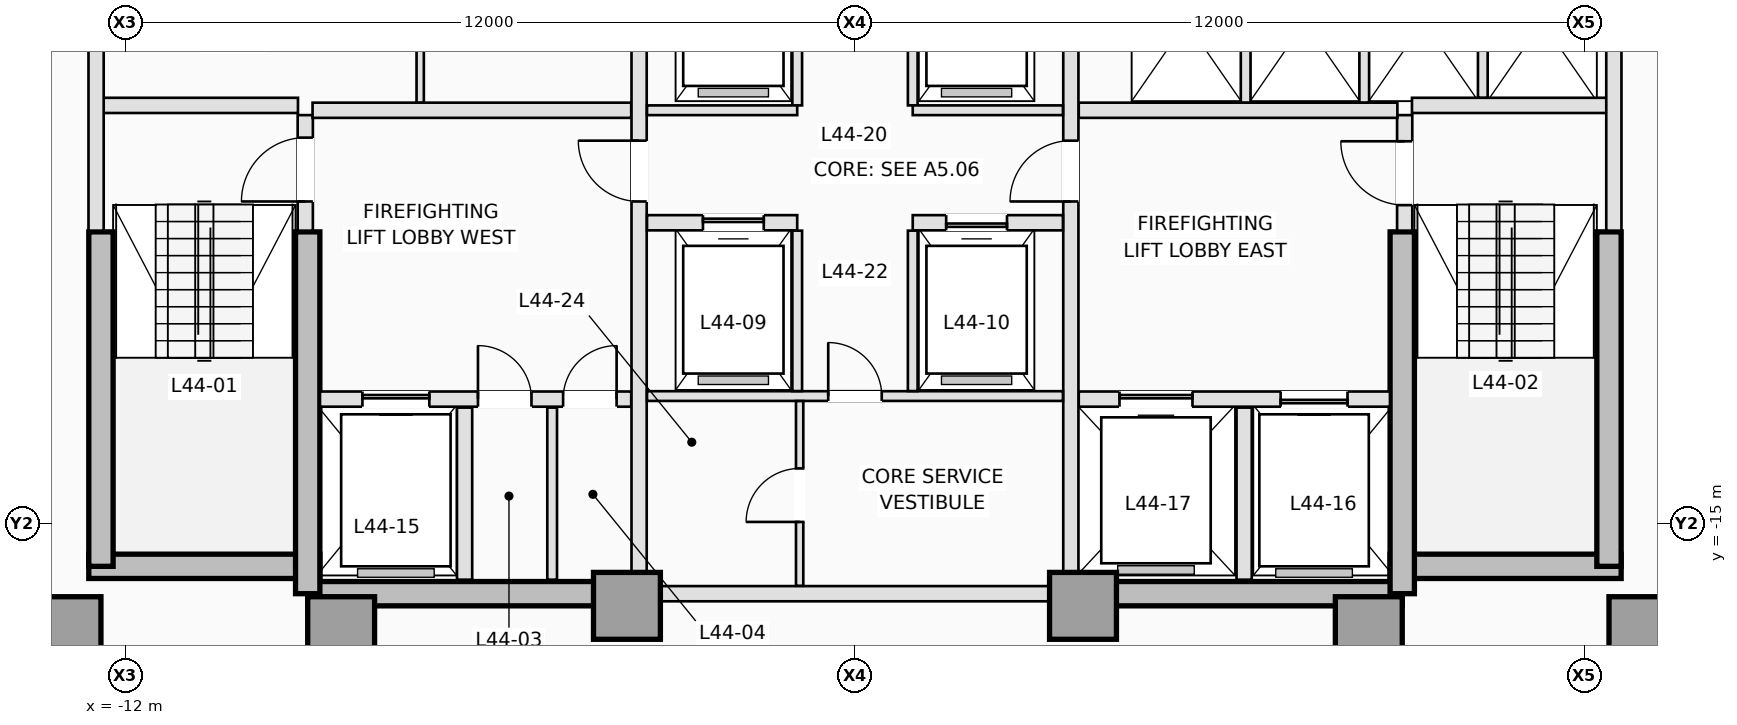
"""IFC4 building model, lengths in metres.
Left out: names, types, materials, properties, quantities, classifications, styles, units other than length and angle.
Written with IfcOpenShell. Run it as: python <this file> out.ifc"""

import sys

from ifc_helpers import new_model, si_unit, direction, frame, frame_2d, origin, origin_2d, place, context, subcontext, project, spatial, rectangle, extrude, element, fill, save


model = new_model("IFC4")
c1 = context("Model", 3, precision=1e-05, world=origin(), true_north=direction((0.0, 1.0)))
c2 = subcontext(c1, "Body", "Model", "MODEL_VIEW")
j1 = project(units=[si_unit("LENGTHUNIT", "METRE"), si_unit("PLANEANGLEUNIT", "RADIAN")], contexts=[c1])
p1 = place(None, origin())
s1 = spatial("IfcSite", under=j1, at=p1, CompositionType="ELEMENT")
p2 = place(p1, origin())
s2 = spatial("IfcBuilding", under=s1, at=p2, CompositionType="ELEMENT")
p3 = place(p2, frame((0.0, 0.0, 161.5)))
s3 = spatial("IfcBuildingStorey", under=s2, at=p3, CompositionType="ELEMENT", Elevation=161.5)
p4 = place(p3, frame((-12.6, -15.7, 0.0), z_axis=(0.0, 0.0, 1.0), x_axis=(1.0, 0.0, 0.0)))
e1 = element("IfcWall", 1, at=p4, inside=s3, PredefinedType="SHEAR", context=c2, shape_type="SweptSolid", body=[
    extrude(rectangle(XDim=3.8, YDim=0.4, at=frame_2d((1.9, 0.0))), origin(), (0.0, 0.0, 1.0), 3.5),
])
for number, where, z_axis, x_axis in (
    (2, (-9.0, -16.15, 0.0), (0.0, 0.0, 1.0), (1.0, 0.0, 0.0)),
    (3, (3.75, -16.15, 0.0), (0.0, 0.0, 1.0), (1.0, 0.0, 0.0)),
):
    element("IfcWall", number, at=place(p3, frame(where, z_axis=z_axis, x_axis=x_axis)), inside=s3, PredefinedType="SHEAR", context=c2, shape_type="SweptSolid", body=[
        extrude(rectangle(XDim=5.25, YDim=0.4, at=frame_2d((2.625, 0.0))), origin(), (0.0, 0.0, 1.0), 3.5),
    ])
p5 = place(p3, frame((8.8, -15.7, 0.0), z_axis=(0.0, 0.0, 1.0), x_axis=(1.0, 0.0, 0.0)))
e4 = element("IfcWall", 4, at=p5, inside=s3, PredefinedType="SHEAR", context=c2, shape_type="SweptSolid", body=[
    extrude(rectangle(XDim=3.8, YDim=0.4, at=frame_2d((1.9, 0.0))), origin(), (0.0, 0.0, 1.0), 3.5),
])
for number, where, z_axis, x_axis in (
    (5, (-12.4, -15.7, 0.0), (0.0, 0.0, 1.0), (0.0, 1.0, 0.0)),
    (6, (12.4, -15.7, 0.0), (0.0, 0.0, 1.0), (0.0, 1.0, 0.0)),
):
    element("IfcWall", number, at=place(p3, frame(where, z_axis=z_axis, x_axis=x_axis)), inside=s3, PredefinedType="SHEAR", context=c2, shape_type="SweptSolid", body=[
        extrude(rectangle(XDim=5.5, YDim=0.4, at=frame_2d((2.75, 0.0))), origin(), (0.0, 0.0, 1.0), 3.5),
    ])
for number, where, z_axis, x_axis in (
    (7, (-9.0, -16.15, 0.0), (0.0, 0.0, 1.0), (0.0, 1.0, 0.0)),
    (8, (9.0, -16.15, 0.0), (0.0, 0.0, 1.0), (0.0, 1.0, 0.0)),
):
    element("IfcWall", number, at=place(p3, frame(where, z_axis=z_axis, x_axis=x_axis)), inside=s3, PredefinedType="SHEAR", context=c2, shape_type="SweptSolid", body=[
        extrude(rectangle(XDim=5.95, YDim=0.4, at=frame_2d((2.975, 0.0))), origin(), (0.0, 0.0, 1.0), 3.5),
    ])
for number, where, z_axis, x_axis in (
    (9, (-12.95, -16.75, 0.0), (0.0, 0.0, 1.0), (1.0, 0.0, 0.0)),
    (10, (-8.45, -16.75, 0.0), (0.0, 0.0, 1.0), (1.0, 0.0, 0.0)),
    (11, (-3.75, -16.35, 0.0), (0.0, 0.0, 1.0), (1.0, 0.0, 0.0)),
    (12, (3.75, -16.35, 0.0), (0.0, 0.0, 1.0), (1.0, 0.0, 0.0)),
    (13, (8.45, -16.75, 0.0), (0.0, 0.0, 1.0), (1.0, 0.0, 0.0)),
    (14, (12.95, -16.75, 0.0), (0.0, 0.0, 1.0), (1.0, 0.0, 0.0)),
):
    element("IfcColumn", number, at=place(p3, frame(where, z_axis=z_axis, x_axis=x_axis)), inside=s3, PredefinedType="COLUMN", context=c2, shape_type="SweptSolid", body=[
        extrude(rectangle(XDim=1.1, YDim=1.1, at=origin_2d()), origin(), (0.0, 0.0, 1.0), 3.5),
    ])
p6 = place(p3, frame((-9.04, -10.18, 0.0), z_axis=(0.0, 0.0, 1.0), x_axis=(0.0, 1.0, 0.0)))
e15 = element("IfcWall", 15, at=p6, inside=s3, PredefinedType="PARTITIONING", context=c2, shape_type="SweptSolid", body=[
    extrude(rectangle(XDim=1.9, YDim=0.25, at=frame_2d((0.95, 0.0))), origin(), (0.0, 0.0, 1.0), 3.25),
])
p7 = place(p6, frame((0.48, 0.0, 0.0)))
e16 = element("IfcOpeningElement", 16, at=p7, cuts=e15, PredefinedType="OPENING", context=c2, shape_type="SweptSolid", body=[
    extrude(rectangle(XDim=1.05, YDim=2.15, at=frame_2d((0.525, 1.075))), frame((0.0, 0.135, 0.0), z_axis=(0.0, -1.0, 0.0), x_axis=(1.0, 0.0, 0.0)), (0.0, 0.0, 1.0), 0.27),
])
p8 = place(p3, frame((9.04, -10.18, 0.0), z_axis=(0.0, 0.0, 1.0), x_axis=(0.0, 1.0, 0.0)))
e17 = element("IfcWall", 17, at=p8, inside=s3, PredefinedType="PARTITIONING", context=c2, shape_type="SweptSolid", body=[
    extrude(rectangle(XDim=1.9, YDim=0.25, at=frame_2d((0.95, 0.0))), origin(), (0.0, 0.0, 1.0), 3.25),
])
p9 = place(p8, frame((0.42, 0.0, 0.0)))
e18 = element("IfcOpeningElement", 18, at=p9, cuts=e17, PredefinedType="OPENING", context=c2, shape_type="SweptSolid", body=[
    extrude(rectangle(XDim=1.05, YDim=2.15, at=frame_2d((0.525, 1.075))), frame((0.0, 0.135, 0.0), z_axis=(0.0, -1.0, 0.0), x_axis=(1.0, 0.0, 0.0)), (0.0, 0.0, 1.0), 0.27),
])
for number, where, z_axis, x_axis in (
    (19, (-12.38, -8.12, 0.0), (0.0, 0.0, 1.0), (1.0, 0.0, 0.0)),
    (20, (9.16, -8.12, 0.0), (0.0, 0.0, 1.0), (1.0, 0.0, 0.0)),
):
    element("IfcWall", number, at=place(p3, frame(where, z_axis=z_axis, x_axis=x_axis)), inside=s3, PredefinedType="PARTITIONING", context=c2, shape_type="SweptSolid", body=[
        extrude(rectangle(XDim=3.22, YDim=0.25, at=frame_2d((1.61, 0.0))), origin(), (0.0, 0.0, 1.0), 3.25),
    ])
for number, where, z_axis, x_axis in (
    (21, (-12.48, -10.18, 0.0), (0.0, 0.0, 1.0), (0.0, 1.0, 0.0)),
    (22, (12.48, -10.18, 0.0), (0.0, 0.0, 1.0), (0.0, 1.0, 0.0)),
):
    element("IfcWall", number, at=place(p3, frame(where, z_axis=z_axis, x_axis=x_axis)), inside=s3, PredefinedType="PARTITIONING", context=c2, shape_type="SweptSolid", body=[
        extrude(rectangle(XDim=4.828, YDim=0.25, at=frame_2d((2.414, 0.0))), origin(), (0.0, 0.0, 1.0), 3.25),
    ])
p10 = place(p3, frame((-8.798, -12.95, 0.0), z_axis=(0.0, 0.0, 1.0), x_axis=(1.0, 0.0, 0.0)))
e23 = element("IfcWall", 23, at=p10, inside=s3, PredefinedType="PARTITIONING", context=c2, shape_type="SweptSolid", body=[
    extrude(rectangle(XDim=5.118, YDim=0.25, at=frame_2d((2.559, 0.0))), origin(), (0.0, 0.0, 1.0), 3.25),
])
p11 = place(p10, frame((0.698, 0.0, 0.0)))
e24 = element("IfcOpeningElement", 24, at=p11, cuts=e23, PredefinedType="OPENING", context=c2, shape_type="SweptSolid", body=[
    extrude(rectangle(XDim=1.1, YDim=2.15, at=frame_2d((0.55, 1.075))), frame((0.0, 0.135, 0.0), z_axis=(0.0, -1.0, 0.0), x_axis=(1.0, 0.0, 0.0)), (0.0, 0.0, 1.0), 0.27),
])
p12 = place(p10, frame((2.598, 0.0, 0.0)))
e25 = element("IfcOpeningElement", 25, at=p12, cuts=e23, PredefinedType="OPENING", context=c2, shape_type="SweptSolid", body=[
    extrude(rectangle(XDim=0.88, YDim=2.1, at=frame_2d((0.44, 1.05))), frame((0.0, 0.135, 0.0), z_axis=(0.0, -1.0, 0.0), x_axis=(1.0, 0.0, 0.0)), (0.0, 0.0, 1.0), 0.27),
])
p13 = place(p10, frame((3.998, 0.0, 0.0)))
e26 = element("IfcOpeningElement", 26, at=p13, cuts=e23, PredefinedType="OPENING", context=c2, shape_type="SweptSolid", body=[
    extrude(rectangle(XDim=0.88, YDim=2.1, at=frame_2d((0.44, 1.05))), frame((0.0, 0.135, 0.0), z_axis=(0.0, -1.0, 0.0), x_axis=(1.0, 0.0, 0.0)), (0.0, 0.0, 1.0), 0.27),
])
p14 = place(p3, frame((3.68, -12.95, 0.0), z_axis=(0.0, 0.0, 1.0), x_axis=(1.0, 0.0, 0.0)))
e27 = element("IfcWall", 27, at=p14, inside=s3, PredefinedType="PARTITIONING", context=c2, shape_type="SweptSolid", body=[
    extrude(rectangle(XDim=5.118, YDim=0.25, at=frame_2d((2.559, 0.0))), origin(), (0.0, 0.0, 1.0), 3.25),
])
p15 = place(p14, frame((3.32, 0.0, 0.0)))
e28 = element("IfcOpeningElement", 28, at=p15, cuts=e27, PredefinedType="OPENING", context=c2, shape_type="SweptSolid", body=[
    extrude(rectangle(XDim=1.1, YDim=2.15, at=frame_2d((0.55, 1.075))), frame((0.0, 0.135, 0.0), z_axis=(0.0, -1.0, 0.0), x_axis=(1.0, 0.0, 0.0)), (0.0, 0.0, 1.0), 0.27),
])
p16 = place(p14, frame((0.67, 0.0, 0.0)))
e29 = element("IfcOpeningElement", 29, at=p16, cuts=e27, PredefinedType="OPENING", context=c2, shape_type="SweptSolid", body=[
    extrude(rectangle(XDim=1.2, YDim=2.15, at=frame_2d((0.6, 1.075))), frame((0.0, 0.135, 0.0), z_axis=(0.0, -1.0, 0.0), x_axis=(1.0, 0.0, 0.0)), (0.0, 0.0, 1.0), 0.27),
])
p17 = place(p3, frame((-6.42, -15.92, 0.0), z_axis=(0.0, 0.0, 1.0), x_axis=(0.0, 1.0, 0.0)))
e30 = element("IfcWall", 30, at=p17, inside=s3, PredefinedType="PARTITIONING", context=c2, shape_type="SweptSolid", body=[
    extrude(rectangle(XDim=2.83, YDim=0.25, at=frame_2d((1.415, 0.0))), origin(), (0.0, 0.0, 1.0), 3.25),
])
p18 = place(p3, frame((-4.98, -15.92, 0.0), z_axis=(0.0, 0.0, 1.0), x_axis=(0.0, 1.0, 0.0)))
e31 = element("IfcWall", 31, at=p18, inside=s3, PredefinedType="PARTITIONING", context=c2, shape_type="SweptSolid", body=[
    extrude(rectangle(XDim=2.83, YDim=0.16, at=frame_2d((1.415, 0.0))), origin(), (0.0, 0.0, 1.0), 3.25),
])
p19 = place(p3, frame((6.4, -15.92, 0.0), z_axis=(0.0, 0.0, 1.0), x_axis=(0.0, 1.0, 0.0)))
e32 = element("IfcWall", 32, at=p19, inside=s3, PredefinedType="PARTITIONING", context=c2, shape_type="SweptSolid", body=[
    extrude(rectangle(XDim=2.83, YDim=0.25, at=frame_2d((1.415, 0.0))), origin(), (0.0, 0.0, 1.0), 3.25),
])
for number, where, z_axis, x_axis in (
    (33, (-8.92, -8.2, 0.0), (0.0, 0.0, 1.0), (1.0, 0.0, 0.0)),
    (34, (3.68, -8.2, 0.0), (0.0, 0.0, 1.0), (1.0, 0.0, 0.0)),
):
    element("IfcWall", number, at=place(p3, frame(where, z_axis=z_axis, x_axis=x_axis)), inside=s3, PredefinedType="PARTITIONING", context=c2, shape_type="SweptSolid", body=[
        extrude(rectangle(XDim=5.24, YDim=0.25, at=frame_2d((2.62, 0.0))), origin(), (0.0, 0.0, 1.0), 3.25),
    ])
p20 = place(p3, frame((-3.55, -15.798, 0.0), z_axis=(0.0, 0.0, 1.0), x_axis=(0.0, 1.0, 0.0)))
e35 = element("IfcWall", 35, at=p20, inside=s3, PredefinedType="PARTITIONING", context=c2, shape_type="SweptSolid", body=[
    extrude(rectangle(XDim=10.446, YDim=0.25, at=frame_2d((5.223, 0.0))), origin(), (0.0, 0.0, 1.0), 3.25),
])
p21 = place(p20, frame((6.098, 0.0, 0.0)))
e36 = element("IfcOpeningElement", 36, at=p21, cuts=e35, PredefinedType="OPENING", context=c2, shape_type="SweptSolid", body=[
    extrude(rectangle(XDim=1.0, YDim=2.15, at=frame_2d((0.5, 1.075))), frame((0.0, 0.135, 0.0), z_axis=(0.0, -1.0, 0.0), x_axis=(1.0, 0.0, 0.0)), (0.0, 0.0, 1.0), 0.27),
])
p22 = place(p3, frame((3.55, -15.798, 0.0), z_axis=(0.0, 0.0, 1.0), x_axis=(0.0, 1.0, 0.0)))
e37 = element("IfcWall", 37, at=p22, inside=s3, PredefinedType="PARTITIONING", context=c2, shape_type="SweptSolid", body=[
    extrude(rectangle(XDim=10.446, YDim=0.25, at=frame_2d((5.223, 0.0))), origin(), (0.0, 0.0, 1.0), 3.25),
])
p23 = place(p22, frame((6.098, 0.0, 0.0)))
e38 = element("IfcOpeningElement", 38, at=p23, cuts=e37, PredefinedType="OPENING", context=c2, shape_type="SweptSolid", body=[
    extrude(rectangle(XDim=1.0, YDim=2.15, at=frame_2d((0.5, 1.075))), frame((0.0, 0.135, 0.0), z_axis=(0.0, -1.0, 0.0), x_axis=(1.0, 0.0, 0.0)), (0.0, 0.0, 1.0), 0.27),
])
p24 = place(p3, frame((-7.15, -8.073, 0.0), z_axis=(0.0, 0.0, 1.0), x_axis=(0.0, 1.0, 0.0)))
e39 = element("IfcWall", 39, at=p24, inside=s3, PredefinedType="PARTITIONING", context=c2, shape_type="SweptSolid", body=[
    extrude(rectangle(XDim=2.733, YDim=0.12, at=frame_2d((1.366, 0.0))), origin(), (0.0, 0.0, 1.0), 3.25),
])
for number, where, z_axis, x_axis in (
    (40, (6.425, -8.073, 0.0), (0.0, 0.0, 1.0), (0.0, 1.0, 0.0)),
    (41, (8.375, -8.073, 0.0), (0.0, 0.0, 1.0), (0.0, 1.0, 0.0)),
):
    element("IfcWall", number, at=place(p3, frame(where, z_axis=z_axis, x_axis=x_axis)), inside=s3, PredefinedType="PARTITIONING", context=c2, shape_type="SweptSolid", body=[
        extrude(rectangle(XDim=2.733, YDim=0.16, at=frame_2d((1.366, 0.0))), origin(), (0.0, 0.0, 1.0), 3.25),
    ])
p25 = place(p3, frame((10.325, -7.993, 0.0), z_axis=(0.0, 0.0, 1.0), x_axis=(0.0, 1.0, 0.0)))
e42 = element("IfcWall", 42, at=p25, inside=s3, PredefinedType="PARTITIONING", context=c2, shape_type="SweptSolid", body=[
    extrude(rectangle(XDim=2.653, YDim=0.16, at=frame_2d((1.326, 0.0))), origin(), (0.0, 0.0, 1.0), 3.25),
])
p26 = place(p3, frame((-3.198, -16.15, 0.0), z_axis=(0.0, 0.0, 1.0), x_axis=(1.0, 0.0, 0.0)))
e43 = element("IfcWall", 43, at=p26, inside=s3, PredefinedType="PARTITIONING", context=c2, shape_type="SweptSolid", body=[
    extrude(rectangle(XDim=6.396, YDim=0.25, at=frame_2d((3.198, 0.0))), origin(), (0.0, 0.0, 1.0), 2.45),
])
for number, where, z_axis, x_axis in (
    (44, (-0.95, -8.12, 0.0), (0.0, 0.0, 1.0), (0.0, 1.0, 0.0)),
    (45, (0.95, -8.12, 0.0), (0.0, 0.0, 1.0), (0.0, 1.0, 0.0)),
):
    element("IfcWall", number, at=place(p3, frame(where, z_axis=z_axis, x_axis=x_axis)), inside=s3, PredefinedType="PARTITIONING", context=c2, shape_type="SweptSolid", body=[
        extrude(rectangle(XDim=2.78, YDim=0.16, at=frame_2d((1.39, 0.0))), origin(), (0.0, 0.0, 1.0), 3.25),
    ])
for number, where, z_axis, x_axis in (
    (46, (-3.42, -8.2, 0.0), (0.0, 0.0, 1.0), (1.0, 0.0, 0.0)),
    (47, (0.95, -8.2, 0.0), (0.0, 0.0, 1.0), (1.0, 0.0, 0.0)),
):
    element("IfcWall", number, at=place(p3, frame(where, z_axis=z_axis, x_axis=x_axis)), inside=s3, PredefinedType="PARTITIONING", context=c2, shape_type="SweptSolid", body=[
        extrude(rectangle(XDim=2.47, YDim=0.16, at=frame_2d((1.235, 0.0))), origin(), (0.0, 0.0, 1.0), 3.25),
    ])
p27 = place(p3, frame((-3.42, -10.05, 0.0), z_axis=(0.0, 0.0, 1.0), x_axis=(1.0, 0.0, 0.0)))
e48 = element("IfcWall", 48, at=p27, inside=s3, PredefinedType="PARTITIONING", context=c2, shape_type="SweptSolid", body=[
    extrude(rectangle(XDim=2.47, YDim=0.25, at=frame_2d((1.235, 0.0))), origin(), (0.0, 0.0, 1.0), 3.25),
])
p28 = place(p27, frame((0.92, 0.0, 0.0)))
e49 = element("IfcOpeningElement", 49, at=p28, cuts=e48, PredefinedType="OPENING", context=c2, shape_type="SweptSolid", body=[
    extrude(rectangle(XDim=1.0, YDim=2.15, at=frame_2d((0.5, 1.075))), frame((0.0, 0.135, 0.0), z_axis=(0.0, -1.0, 0.0), x_axis=(1.0, 0.0, 0.0)), (0.0, 0.0, 1.0), 0.27),
])
p29 = place(p3, frame((0.95, -10.05, 0.0), z_axis=(0.0, 0.0, 1.0), x_axis=(1.0, 0.0, 0.0)))
e50 = element("IfcWall", 50, at=p29, inside=s3, PredefinedType="PARTITIONING", context=c2, shape_type="SweptSolid", body=[
    extrude(rectangle(XDim=2.47, YDim=0.25, at=frame_2d((1.235, 0.0))), origin(), (0.0, 0.0, 1.0), 3.25),
])
p30 = place(p29, frame((0.55, 0.0, 0.0)))
e51 = element("IfcOpeningElement", 51, at=p30, cuts=e50, PredefinedType="OPENING", context=c2, shape_type="SweptSolid", body=[
    extrude(rectangle(XDim=1.0, YDim=2.15, at=frame_2d((0.5, 1.075))), frame((0.0, 0.135, 0.0), z_axis=(0.0, -1.0, 0.0), x_axis=(1.0, 0.0, 0.0)), (0.0, 0.0, 1.0), 0.27),
])
p31 = place(p3, frame((-3.42, -12.9, 0.0), z_axis=(0.0, 0.0, 1.0), x_axis=(1.0, 0.0, 0.0)))
e52 = element("IfcWall", 52, at=p31, inside=s3, PredefinedType="PARTITIONING", context=c2, shape_type="SweptSolid", body=[
    extrude(rectangle(XDim=6.84, YDim=0.16, at=frame_2d((3.42, 0.0))), origin(), (0.0, 0.0, 1.0), 3.25),
])
p32 = place(p31, frame((2.98, 0.0, 0.0)))
e53 = element("IfcOpeningElement", 53, at=p32, cuts=e52, PredefinedType="OPENING", context=c2, shape_type="SweptSolid", body=[
    extrude(rectangle(XDim=0.88, YDim=2.12, at=frame_2d((0.44, 1.06))), frame((0.0, 0.09, 0.0), z_axis=(0.0, -1.0, 0.0), x_axis=(1.0, 0.0, 0.0)), (0.0, 0.0, 1.0), 0.18),
])
for number, where, z_axis, x_axis in (
    (54, (-0.95, -12.818, 0.0), (0.0, 0.0, 1.0), (0.0, 1.0, 0.0)),
    (55, (0.95, -12.818, 0.0), (0.0, 0.0, 1.0), (0.0, 1.0, 0.0)),
):
    element("IfcWall", number, at=place(p3, frame(where, z_axis=z_axis, x_axis=x_axis)), inside=s3, PredefinedType="PARTITIONING", context=c2, shape_type="SweptSolid", body=[
        extrude(rectangle(XDim=2.638, YDim=0.16, at=frame_2d((1.319, 0.0))), origin(), (0.0, 0.0, 1.0), 3.25),
    ])
p33 = place(p3, frame((-0.91, -16.02, 0.0), z_axis=(0.0, 0.0, 1.0), x_axis=(0.0, 1.0, 0.0)))
e56 = element("IfcWall", 56, at=p33, inside=s3, PredefinedType="PARTITIONING", context=c2, shape_type="SweptSolid", body=[
    extrude(rectangle(XDim=3.038, YDim=0.12, at=frame_2d((1.519, 0.0))), origin(), (0.0, 0.0, 1.0), 3.25),
])
p34 = place(p33, frame((1.05, 0.0, 0.0)))
e57 = element("IfcOpeningElement", 57, at=p34, cuts=e56, PredefinedType="OPENING", context=c2, shape_type="SweptSolid", body=[
    extrude(rectangle(XDim=0.88, YDim=2.12, at=frame_2d((0.44, 1.06))), frame((0.0, 0.07, 0.0), z_axis=(0.0, -1.0, 0.0), x_axis=(1.0, 0.0, 0.0)), (0.0, 0.0, 1.0), 0.14),
])
p35 = place(p11, origin())
e58 = element("IfcDoor", 58, at=p35, inside=s3, OperationType="SLIDING_TO_LEFT", PredefinedType="DOOR", context=c2, shape_type="SweptSolid", body=[
    extrude(rectangle(XDim=1.1, YDim=2.15, at=frame_2d((0.55, 1.075))), frame((0.0, 0.025, 0.0), z_axis=(0.0, -1.0, 0.0), x_axis=(1.0, 0.0, 0.0)), (0.0, 0.0, 1.0), 0.05),
])
fill(e24, e58)
p36 = place(p15, origin())
e59 = element("IfcDoor", 59, at=p36, inside=s3, OperationType="SLIDING_TO_RIGHT", PredefinedType="DOOR", context=c2, shape_type="SweptSolid", body=[
    extrude(rectangle(XDim=1.1, YDim=2.15, at=frame_2d((0.55, 1.075))), frame((0.0, 0.025, 0.0), z_axis=(0.0, -1.0, 0.0), x_axis=(1.0, 0.0, 0.0)), (0.0, 0.0, 1.0), 0.05),
])
fill(e28, e59)
p37 = place(p16, origin())
e60 = element("IfcDoor", 60, at=p37, inside=s3, OperationType="SLIDING_TO_LEFT", PredefinedType="DOOR", context=c2, shape_type="SweptSolid", body=[
    extrude(rectangle(XDim=1.2, YDim=2.15, at=frame_2d((0.6, 1.075))), frame((0.0, 0.025, 0.0), z_axis=(0.0, -1.0, 0.0), x_axis=(1.0, 0.0, 0.0)), (0.0, 0.0, 1.0), 0.05),
])
fill(e29, e60)
p38 = place(p28, origin())
e61 = element("IfcDoor", 61, at=p38, inside=s3, OperationType="SLIDING_TO_LEFT", PredefinedType="DOOR", context=c2, shape_type="SweptSolid", body=[
    extrude(rectangle(XDim=1.0, YDim=2.15, at=frame_2d((0.5, 1.075))), frame((0.0, 0.025, 0.0), z_axis=(0.0, -1.0, 0.0), x_axis=(1.0, 0.0, 0.0)), (0.0, 0.0, 1.0), 0.05),
])
fill(e49, e61)
p39 = place(p30, origin())
e62 = element("IfcDoor", 62, at=p39, inside=s3, OperationType="SLIDING_TO_RIGHT", PredefinedType="DOOR", context=c2, shape_type="SweptSolid", body=[
    extrude(rectangle(XDim=1.0, YDim=2.15, at=frame_2d((0.5, 1.075))), frame((0.0, 0.025, 0.0), z_axis=(0.0, -1.0, 0.0), x_axis=(1.0, 0.0, 0.0)), (0.0, 0.0, 1.0), 0.05),
])
fill(e51, e62)
p40 = place(p7, origin())
e63 = element("IfcDoor", 63, at=p40, inside=s3, OperationType="SINGLE_SWING_LEFT", PredefinedType="DOOR", context=c2, shape_type="SweptSolid", body=[
    extrude(rectangle(XDim=1.05, YDim=2.15, at=frame_2d((0.525, 1.075))), frame((0.0, 0.025, 0.0), z_axis=(0.0, -1.0, 0.0), x_axis=(1.0, 0.0, 0.0)), (0.0, 0.0, 1.0), 0.05),
])
fill(e16, e63)
p41 = place(p9, origin())
e64 = element("IfcDoor", 64, at=p41, inside=s3, OperationType="SINGLE_SWING_RIGHT", PredefinedType="DOOR", context=c2, shape_type="SweptSolid", body=[
    extrude(rectangle(XDim=1.05, YDim=2.15, at=frame_2d((0.525, 1.075))), frame((0.0, 0.025, 0.0), z_axis=(0.0, -1.0, 0.0), x_axis=(1.0, 0.0, 0.0)), (0.0, 0.0, 1.0), 0.05),
])
fill(e18, e64)
p42 = place(p12, origin())
e65 = element("IfcDoor", 65, at=p42, inside=s3, OperationType="SINGLE_SWING_LEFT", PredefinedType="TRAPDOOR", context=c2, shape_type="SweptSolid", body=[
    extrude(rectangle(XDim=0.88, YDim=2.1, at=frame_2d((0.44, 1.05))), frame((0.0, 0.025, 0.0), z_axis=(0.0, -1.0, 0.0), x_axis=(1.0, 0.0, 0.0)), (0.0, 0.0, 1.0), 0.05),
])
fill(e25, e65)
p43 = place(p13, origin())
e66 = element("IfcDoor", 66, at=p43, inside=s3, OperationType="SINGLE_SWING_RIGHT", PredefinedType="TRAPDOOR", context=c2, shape_type="SweptSolid", body=[
    extrude(rectangle(XDim=0.88, YDim=2.1, at=frame_2d((0.44, 1.05))), frame((0.0, 0.025, 0.0), z_axis=(0.0, -1.0, 0.0), x_axis=(1.0, 0.0, 0.0)), (0.0, 0.0, 1.0), 0.05),
])
fill(e26, e66)
p44 = place(p21, origin())
e67 = element("IfcDoor", 67, at=p44, inside=s3, OperationType="SINGLE_SWING_RIGHT", PredefinedType="DOOR", context=c2, shape_type="SweptSolid", body=[
    extrude(rectangle(XDim=1.0, YDim=2.15, at=frame_2d((0.5, 1.075))), frame((0.0, 0.025, 0.0), z_axis=(0.0, -1.0, 0.0), x_axis=(1.0, 0.0, 0.0)), (0.0, 0.0, 1.0), 0.05),
])
fill(e36, e67)
p45 = place(p23, origin())
e68 = element("IfcDoor", 68, at=p45, inside=s3, OperationType="SINGLE_SWING_LEFT", PredefinedType="DOOR", context=c2, shape_type="SweptSolid", body=[
    extrude(rectangle(XDim=1.0, YDim=2.15, at=frame_2d((0.5, 1.075))), frame((0.0, 0.025, 0.0), z_axis=(0.0, -1.0, 0.0), x_axis=(1.0, 0.0, 0.0)), (0.0, 0.0, 1.0), 0.05),
])
fill(e38, e68)
p46 = place(p32, origin())
e69 = element("IfcDoor", 69, at=p46, inside=s3, OperationType="SINGLE_SWING_LEFT", PredefinedType="DOOR", context=c2, shape_type="SweptSolid", body=[
    extrude(rectangle(XDim=0.88, YDim=2.12, at=frame_2d((0.44, 1.06))), frame((0.0, 0.025, 0.0), z_axis=(0.0, -1.0, 0.0), x_axis=(1.0, 0.0, 0.0)), (0.0, 0.0, 1.0), 0.05),
])
fill(e53, e69)
p47 = place(p34, origin())
e70 = element("IfcDoor", 70, at=p47, inside=s3, OperationType="SINGLE_SWING_LEFT", PredefinedType="DOOR", context=c2, shape_type="SweptSolid", body=[
    extrude(rectangle(XDim=0.88, YDim=2.12, at=frame_2d((0.44, 1.06))), frame((0.0, 0.025, 0.0), z_axis=(0.0, -1.0, 0.0), x_axis=(1.0, 0.0, 0.0)), (0.0, 0.0, 1.0), 0.05),
])
fill(e57, e70)
save(model, sys.argv[1])
